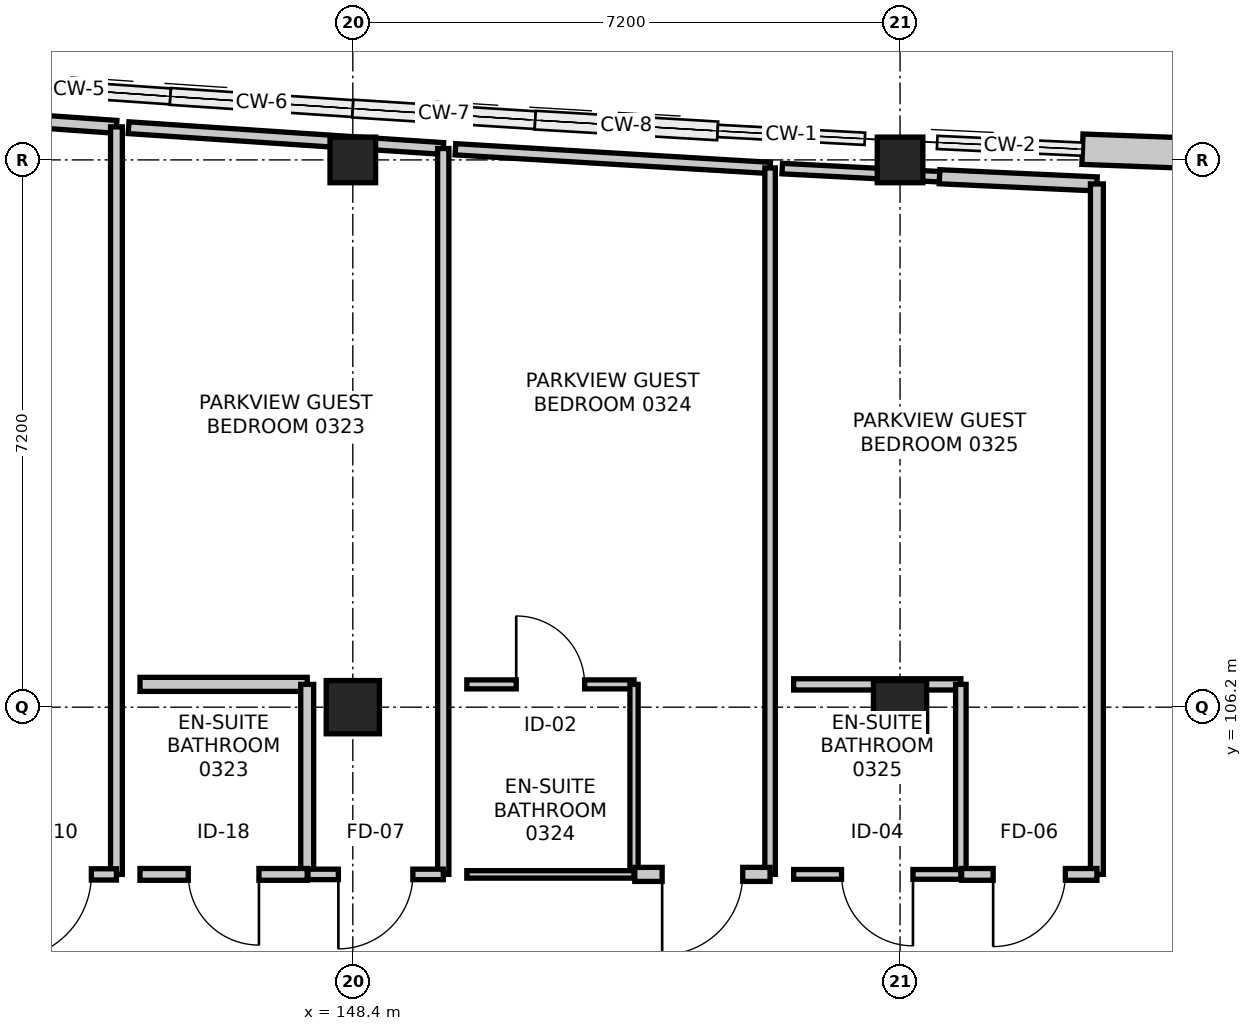
"""IFC4 building model, lengths in metres.
Left out: names, types, materials, properties, quantities, classifications, styles, units other than length and angle.
Written with IfcOpenShell. Run it as: python <this file> out.ifc"""

import sys

from ifc_helpers import new_model, si_unit, direction, frame, frame_2d, origin, origin_2d, place, context, subcontext, project, spatial, rectangle, extrude, element, fill, save


model = new_model("IFC4")
c1 = context("Model", 3, precision=1e-05, world=origin(), true_north=direction((0.0, 1.0)))
c2 = subcontext(c1, "Body", "Model", "MODEL_VIEW")
j1 = project(units=[si_unit("LENGTHUNIT", "METRE"), si_unit("PLANEANGLEUNIT", "RADIAN")], contexts=[c1])
p1 = place(None, origin())
s1 = spatial("IfcSite", under=j1, at=p1, CompositionType="ELEMENT")
p2 = place(p1, origin())
s2 = spatial("IfcBuilding", under=s1, at=p2, CompositionType="ELEMENT")
p3 = place(p2, frame((0.0, 0.0, 15.0)))
s3 = spatial("IfcBuildingStorey", under=s2, at=p3, CompositionType="ELEMENT", Elevation=15.0)
p4 = place(p3, frame((148.4, 106.2, 0.0), z_axis=(0.0, 0.0, 1.0), x_axis=(1.0, 0.0, 0.0)))
e1 = element("IfcColumn", 1, at=p4, inside=s3, PredefinedType="COLUMN", context=c2, shape_type="SweptSolid", body=[
    extrude(rectangle(XDim=0.7, YDim=0.7, at=origin_2d()), origin(), (0.0, 0.0, 1.0), 4.2),
])
p5 = place(p3, frame((148.4, 113.4, 0.0), z_axis=(0.0, 0.0, 1.0), x_axis=(1.0, 0.0, 0.0)))
e2 = element("IfcColumn", 2, at=p5, inside=s3, PredefinedType="COLUMN", context=c2, shape_type="SweptSolid", body=[
    extrude(rectangle(XDim=0.6, YDim=0.6, at=origin_2d()), origin(), (0.0, 0.0, 1.0), 4.2),
])
p6 = place(p3, frame((155.6, 106.2, 0.0), z_axis=(0.0, 0.0, 1.0), x_axis=(1.0, 0.0, 0.0)))
e3 = element("IfcColumn", 3, at=p6, inside=s3, PredefinedType="COLUMN", context=c2, shape_type="SweptSolid", body=[
    extrude(rectangle(XDim=0.7, YDim=0.7, at=origin_2d()), origin(), (0.0, 0.0, 1.0), 4.2),
])
p7 = place(p3, frame((155.6, 113.4, 0.0), z_axis=(0.0, 0.0, 1.0), x_axis=(1.0, 0.0, 0.0)))
e4 = element("IfcColumn", 4, at=p7, inside=s3, PredefinedType="COLUMN", context=c2, shape_type="SweptSolid", body=[
    extrude(rectangle(XDim=0.6, YDim=0.6, at=origin_2d()), origin(), (0.0, 0.0, 1.0), 4.2),
])
p8 = place(p3, frame((158.0, 113.541, 0.0), z_axis=(0.0, 0.0, 1.0), x_axis=(0.99930757318, -0.037207179225, 0.0)))
e5 = element("IfcWall", 5, at=p8, inside=s3, PredefinedType="STANDARD", context=c2, shape_type="SweptSolid", body=[
    extrude(rectangle(XDim=2.402, YDim=0.4, at=frame_2d((1.201, 0.0))), origin(), (0.0, 0.0, 1.0), 3.325),
])
p9 = place(p3, frame((141.15, 114.125, 0.0), z_axis=(0.0, 0.0, 1.0), x_axis=(0.997551011222, -0.069942690904, 0.0)))
e6 = element("IfcWall", 6, at=p9, inside=s3, PredefinedType="PARTITIONING", context=c2, shape_type="SweptSolid", body=[
    extrude(rectangle(XDim=4.15, YDim=0.17, at=frame_2d((2.075, 0.0))), origin(), (0.0, 0.0, 1.0), 3.516),
])
p10 = place(p3, frame((145.29, 113.834, 0.0), z_axis=(0.0, 0.0, 1.0), x_axis=(0.0, -1.0, 0.0)))
e7 = element("IfcWall", 7, at=p10, inside=s3, PredefinedType="PARTITIONING", context=c2, shape_type="SweptSolid", body=[
    extrude(rectangle(XDim=9.834, YDim=0.155, at=frame_2d((4.917, 0.0))), origin(), (0.0, 0.0, 1.0), 3.325),
])
p11 = place(p3, frame((145.29, 104.0, 0.0), z_axis=(0.0, 0.0, 1.0), x_axis=(-1.0, 0.0, 0.0)))
e8 = element("IfcWall", 8, at=p11, inside=s3, PredefinedType="PARTITIONING", context=c2, shape_type="SweptSolid", body=[
    extrude(rectangle(XDim=1.78, YDim=0.148, at=frame_2d((0.89, 0.0))), origin(), (0.0, 0.0, 1.0), 3.94),
])
p12 = place(p11, frame((0.33, 0.0, 0.0)))
e9 = element("IfcOpeningElement", 9, at=p12, cuts=e8, PredefinedType="OPENING", context=c2, shape_type="SweptSolid", body=[
    extrude(rectangle(XDim=1.12, YDim=2.2, at=frame_2d((0.56, 1.1))), frame((0.0, 0.084, 0.0), z_axis=(0.0, -1.0, 0.0), x_axis=(1.0, 0.0, 0.0)), (0.0, 0.0, 1.0), 0.168),
])
p13 = place(p3, frame((145.6, 106.5, 0.0), z_axis=(0.0, 0.0, 1.0), x_axis=(1.0, 0.0, 0.0)))
e10 = element("IfcWall", 10, at=p13, inside=s3, PredefinedType="PARTITIONING", context=c2, shape_type="SweptSolid", body=[
    extrude(rectangle(XDim=2.2, YDim=0.185, at=frame_2d((1.1, 0.0))), origin(), (0.0, 0.0, 1.0), 3.325),
])
p14 = place(p3, frame((147.8, 106.5, 0.0), z_axis=(0.0, 0.0, 1.0), x_axis=(0.0, -1.0, 0.0)))
e11 = element("IfcWall", 11, at=p14, inside=s3, PredefinedType="PARTITIONING", context=c2, shape_type="SweptSolid", body=[
    extrude(rectangle(XDim=2.5, YDim=0.17, at=frame_2d((1.25, 0.0))), origin(), (0.0, 0.0, 1.0), 3.325),
])
p15 = place(p3, frame((147.8, 104.0, 0.0), z_axis=(0.0, 0.0, 1.0), x_axis=(-1.0, 0.0, 0.0)))
e12 = element("IfcWall", 12, at=p15, inside=s3, PredefinedType="PARTITIONING", context=c2, shape_type="SweptSolid", body=[
    extrude(rectangle(XDim=2.2, YDim=0.155, at=frame_2d((1.1, 0.0))), origin(), (0.0, 0.0, 1.0), 3.94),
])
p16 = place(p15, frame((0.635, 0.0, 0.0)))
e13 = element("IfcOpeningElement", 13, at=p16, cuts=e12, PredefinedType="OPENING", context=c2, shape_type="SweptSolid", body=[
    extrude(rectangle(XDim=0.93, YDim=2.13, at=frame_2d((0.465, 1.065))), frame((0.0, 0.087, 0.0), z_axis=(0.0, -1.0, 0.0), x_axis=(1.0, 0.0, 0.0)), (0.0, 0.0, 1.0), 0.175),
])
p17 = place(p3, frame((145.45, 113.823, 0.0), z_axis=(0.0, 0.0, 1.0), x_axis=(0.997822232691, -0.06596053325, 0.0)))
e14 = element("IfcWall", 14, at=p17, inside=s3, PredefinedType="PARTITIONING", context=c2, shape_type="SweptSolid", body=[
    extrude(rectangle(XDim=4.149, YDim=0.155, at=frame_2d((2.075, 0.0))), origin(), (0.0, 0.0, 1.0), 3.325),
])
p18 = place(p3, frame((149.59, 113.55, 0.0), z_axis=(0.0, 0.0, 1.0), x_axis=(0.0, -1.0, 0.0)))
e15 = element("IfcWall", 15, at=p18, inside=s3, PredefinedType="PARTITIONING", context=c2, shape_type="SweptSolid", body=[
    extrude(rectangle(XDim=9.55, YDim=0.148, at=frame_2d((4.775, 0.0))), origin(), (0.0, 0.0, 1.0), 3.325),
])
p19 = place(p3, frame((149.59, 104.0, 0.0), z_axis=(0.0, 0.0, 1.0), x_axis=(-1.0, 0.0, 0.0)))
e16 = element("IfcWall", 16, at=p19, inside=s3, PredefinedType="PARTITIONING", context=c2, shape_type="SweptSolid", body=[
    extrude(rectangle(XDim=1.78, YDim=0.138, at=frame_2d((0.89, 0.0))), origin(), (0.0, 0.0, 1.0), 3.275),
])
p20 = place(p19, frame((0.4, 0.0, 0.0)))
e17 = element("IfcOpeningElement", 17, at=p20, cuts=e16, PredefinedType="OPENING", context=c2, shape_type="SweptSolid", body=[
    extrude(rectangle(XDim=0.98, YDim=2.15, at=frame_2d((0.49, 1.075))), frame((0.0, 0.079, 0.0), z_axis=(0.0, -1.0, 0.0), x_axis=(1.0, 0.0, 0.0)), (0.0, 0.0, 1.0), 0.158),
])
p21 = place(p3, frame((149.9, 106.5, 0.0), z_axis=(0.0, 0.0, 1.0), x_axis=(1.0, 0.0, 0.0)))
e18 = element("IfcWall", 18, at=p21, inside=s3, PredefinedType="PARTITIONING", context=c2, shape_type="SweptSolid", body=[
    extrude(rectangle(XDim=2.2, YDim=0.118, at=frame_2d((1.1, 0.0))), origin(), (0.0, 0.0, 1.0), 3.94),
])
p22 = place(p21, frame((0.65, 0.0, 0.0)))
e19 = element("IfcOpeningElement", 19, at=p22, cuts=e18, PredefinedType="OPENING", context=c2, shape_type="SweptSolid", body=[
    extrude(rectangle(XDim=0.9, YDim=2.08, at=frame_2d((0.45, 1.04))), frame((0.0, 0.069, 0.0), z_axis=(0.0, -1.0, 0.0), x_axis=(1.0, 0.0, 0.0)), (0.0, 0.0, 1.0), 0.138),
])
p23 = place(p3, frame((152.1, 106.5, 0.0), z_axis=(0.0, 0.0, 1.0), x_axis=(0.0, -1.0, 0.0)))
e20 = element("IfcWall", 20, at=p23, inside=s3, PredefinedType="PARTITIONING", context=c2, shape_type="SweptSolid", body=[
    extrude(rectangle(XDim=2.5, YDim=0.108, at=frame_2d((1.25, 0.0))), origin(), (0.0, 0.0, 1.0), 3.325),
])
p24 = place(p3, frame((152.1, 104.0, 0.0), z_axis=(0.0, 0.0, 1.0), x_axis=(-1.0, 0.0, 0.0)))
e21 = element("IfcWall", 21, at=p24, inside=s3, PredefinedType="PARTITIONING", context=c2, shape_type="SweptSolid", body=[
    extrude(rectangle(XDim=2.2, YDim=0.098, at=frame_2d((1.1, 0.0))), origin(), (0.0, 0.0, 1.0), 3.94),
])
p25 = place(p3, frame((149.75, 113.54, 0.0), z_axis=(0.0, 0.0, 1.0), x_axis=(0.998248291715, -0.059163739646, 0.0)))
e22 = element("IfcWall", 22, at=p25, inside=s3, PredefinedType="PARTITIONING", context=c2, shape_type="SweptSolid", body=[
    extrude(rectangle(XDim=4.147, YDim=0.148, at=frame_2d((2.074, 0.0))), origin(), (0.0, 0.0, 1.0), 3.325),
])
p26 = place(p3, frame((153.89, 113.294, 0.0), z_axis=(0.0, 0.0, 1.0), x_axis=(0.0, -1.0, 0.0)))
e23 = element("IfcWall", 23, at=p26, inside=s3, PredefinedType="PARTITIONING", context=c2, shape_type="SweptSolid", body=[
    extrude(rectangle(XDim=9.294, YDim=0.138, at=frame_2d((4.647, 0.0))), origin(), (0.0, 0.0, 1.0), 3.325),
])
p27 = place(p3, frame((153.89, 104.0, 0.0), z_axis=(0.0, 0.0, 1.0), x_axis=(-1.0, 0.0, 0.0)))
e24 = element("IfcWall", 24, at=p27, inside=s3, PredefinedType="PARTITIONING", context=c2, shape_type="SweptSolid", body=[
    extrude(rectangle(XDim=1.78, YDim=0.185, at=frame_2d((0.89, 0.0))), origin(), (0.0, 0.0, 1.0), 3.94),
])
p28 = place(p27, frame((0.36, 0.0, 0.0)))
e25 = element("IfcOpeningElement", 25, at=p28, cuts=e24, PredefinedType="OPENING", context=c2, shape_type="SweptSolid", body=[
    extrude(rectangle(XDim=1.06, YDim=2.2, at=frame_2d((0.53, 1.1))), frame((0.0, 0.103, 0.0), z_axis=(0.0, -1.0, 0.0), x_axis=(1.0, 0.0, 0.0)), (0.0, 0.0, 1.0), 0.205),
])
p29 = place(p3, frame((154.2, 106.5, 0.0), z_axis=(0.0, 0.0, 1.0), x_axis=(1.0, 0.0, 0.0)))
e26 = element("IfcWall", 26, at=p29, inside=s3, PredefinedType="PARTITIONING", context=c2, shape_type="SweptSolid", body=[
    extrude(rectangle(XDim=2.2, YDim=0.148, at=frame_2d((1.1, 0.0))), origin(), (0.0, 0.0, 1.0), 3.275),
])
p30 = place(p3, frame((156.4, 106.5, 0.0), z_axis=(0.0, 0.0, 1.0), x_axis=(0.0, -1.0, 0.0)))
e27 = element("IfcWall", 27, at=p30, inside=s3, PredefinedType="PARTITIONING", context=c2, shape_type="SweptSolid", body=[
    extrude(rectangle(XDim=2.5, YDim=0.138, at=frame_2d((1.25, 0.0))), origin(), (0.0, 0.0, 1.0), 3.325),
])
p31 = place(p3, frame((156.4, 104.0, 0.0), z_axis=(0.0, 0.0, 1.0), x_axis=(-1.0, 0.0, 0.0)))
e28 = element("IfcWall", 28, at=p31, inside=s3, PredefinedType="PARTITIONING", context=c2, shape_type="SweptSolid", body=[
    extrude(rectangle(XDim=2.2, YDim=0.128, at=frame_2d((1.1, 0.0))), origin(), (0.0, 0.0, 1.0), 3.275),
])
p32 = place(p31, frame((0.63, 0.0, 0.0)))
e29 = element("IfcOpeningElement", 29, at=p32, cuts=e28, PredefinedType="OPENING", context=c2, shape_type="SweptSolid", body=[
    extrude(rectangle(XDim=0.94, YDim=2.12, at=frame_2d((0.47, 1.06))), frame((0.0, 0.074, 0.0), z_axis=(0.0, -1.0, 0.0), x_axis=(1.0, 0.0, 0.0)), (0.0, 0.0, 1.0), 0.148),
])
p33 = place(p3, frame((154.05, 113.286, 0.0), z_axis=(0.0, 0.0, 1.0), x_axis=(0.998656276099, -0.051823182154, 0.0)))
e30 = element("IfcWall", 30, at=p33, inside=s3, PredefinedType="PARTITIONING", context=c2, shape_type="SweptSolid", body=[
    extrude(rectangle(XDim=2.073, YDim=0.138, at=frame_2d((1.036, 0.0))), origin(), (0.0, 0.0, 1.0), 3.325),
])
p34 = place(p3, frame((156.12, 113.178, 0.0), z_axis=(0.0, 0.0, 1.0), x_axis=(0.998959775561, -0.045600074681, 0.0)))
e31 = element("IfcWall", 31, at=p34, inside=s3, PredefinedType="PARTITIONING", context=c2, shape_type="SweptSolid", body=[
    extrude(rectangle(XDim=2.072, YDim=0.185, at=frame_2d((1.036, 0.0))), origin(), (0.0, 0.0, 1.0), 3.325),
])
p35 = place(p3, frame((158.19, 113.084, 0.0), z_axis=(0.0, 0.0, 1.0), x_axis=(0.0, -1.0, 0.0)))
e32 = element("IfcWall", 32, at=p35, inside=s3, PredefinedType="PARTITIONING", context=c2, shape_type="SweptSolid", body=[
    extrude(rectangle(XDim=9.084, YDim=0.17, at=frame_2d((4.542, 0.0))), origin(), (0.0, 0.0, 1.0), 3.325),
])
p36 = place(p3, frame((158.19, 104.0, 0.0), z_axis=(0.0, 0.0, 1.0), x_axis=(-1.0, 0.0, 0.0)))
e33 = element("IfcWall", 33, at=p36, inside=s3, PredefinedType="PARTITIONING", context=c2, shape_type="SweptSolid", body=[
    extrude(rectangle(XDim=1.78, YDim=0.155, at=frame_2d((0.89, 0.0))), origin(), (0.0, 0.0, 1.0), 3.94),
])
p37 = place(p36, frame((0.415, 0.0, 0.0)))
e34 = element("IfcOpeningElement", 34, at=p37, cuts=e33, PredefinedType="OPENING", context=c2, shape_type="SweptSolid", body=[
    extrude(rectangle(XDim=0.95, YDim=2.1, at=frame_2d((0.475, 1.05))), frame((0.0, 0.087, 0.0), z_axis=(0.0, -1.0, 0.0), x_axis=(1.0, 0.0, 0.0)), (0.0, 0.0, 1.0), 0.175),
])
p38 = place(p12, origin())
e35 = element("IfcDoor", 35, at=p38, inside=s3, OperationType="SINGLE_SWING_RIGHT", PredefinedType="DOOR", context=c2, shape_type="SweptSolid", body=[
    extrude(rectangle(XDim=1.12, YDim=2.2, at=frame_2d((0.56, 1.1))), frame((0.0, 0.025, 0.0), z_axis=(0.0, -1.0, 0.0), x_axis=(1.0, 0.0, 0.0)), (0.0, 0.0, 1.0), 0.05),
])
fill(e9, e35)
p39 = place(p16, origin())
e36 = element("IfcDoor", 36, at=p39, inside=s3, OperationType="SINGLE_SWING_LEFT", PredefinedType="DOOR", context=c2, shape_type="SweptSolid", body=[
    extrude(rectangle(XDim=0.93, YDim=2.13, at=frame_2d((0.465, 1.065))), frame((0.0, 0.025, 0.0), z_axis=(0.0, -1.0, 0.0), x_axis=(1.0, 0.0, 0.0)), (0.0, 0.0, 1.0), 0.05),
])
fill(e13, e36)
p40 = place(p20, origin())
e37 = element("IfcDoor", 37, at=p40, inside=s3, OperationType="SINGLE_SWING_RIGHT", PredefinedType="DOOR", context=c2, shape_type="SweptSolid", body=[
    extrude(rectangle(XDim=0.98, YDim=2.15, at=frame_2d((0.49, 1.075))), frame((0.0, 0.025, 0.0), z_axis=(0.0, -1.0, 0.0), x_axis=(1.0, 0.0, 0.0)), (0.0, 0.0, 1.0), 0.05),
])
fill(e17, e37)
p41 = place(p22, origin())
e38 = element("IfcDoor", 38, at=p41, inside=s3, OperationType="SINGLE_SWING_LEFT", PredefinedType="DOOR", context=c2, shape_type="SweptSolid", body=[
    extrude(rectangle(XDim=0.9, YDim=2.08, at=frame_2d((0.45, 1.04))), frame((0.0, 0.025, 0.0), z_axis=(0.0, -1.0, 0.0), x_axis=(1.0, 0.0, 0.0)), (0.0, 0.0, 1.0), 0.05),
])
fill(e19, e38)
p42 = place(p28, origin())
e39 = element("IfcDoor", 39, at=p42, inside=s3, OperationType="SINGLE_SWING_RIGHT", PredefinedType="DOOR", context=c2, shape_type="SweptSolid", body=[
    extrude(rectangle(XDim=1.06, YDim=2.2, at=frame_2d((0.53, 1.1))), frame((0.0, 0.025, 0.0), z_axis=(0.0, -1.0, 0.0), x_axis=(1.0, 0.0, 0.0)), (0.0, 0.0, 1.0), 0.05),
])
fill(e25, e39)
p43 = place(p32, origin())
e40 = element("IfcDoor", 40, at=p43, inside=s3, OperationType="SINGLE_SWING_LEFT", PredefinedType="DOOR", context=c2, shape_type="SweptSolid", body=[
    extrude(rectangle(XDim=0.94, YDim=2.12, at=frame_2d((0.47, 1.06))), frame((0.0, 0.025, 0.0), z_axis=(0.0, -1.0, 0.0), x_axis=(1.0, 0.0, 0.0)), (0.0, 0.0, 1.0), 0.05),
])
fill(e29, e40)
p44 = place(p37, origin())
e41 = element("IfcDoor", 41, at=p44, inside=s3, OperationType="SINGLE_SWING_RIGHT", PredefinedType="DOOR", context=c2, shape_type="SweptSolid", body=[
    extrude(rectangle(XDim=0.95, YDim=2.1, at=frame_2d((0.475, 1.05))), frame((0.0, 0.025, 0.0), z_axis=(0.0, -1.0, 0.0), x_axis=(1.0, 0.0, 0.0)), (0.0, 0.0, 1.0), 0.05),
])
fill(e34, e41)
save(model, sys.argv[1])
